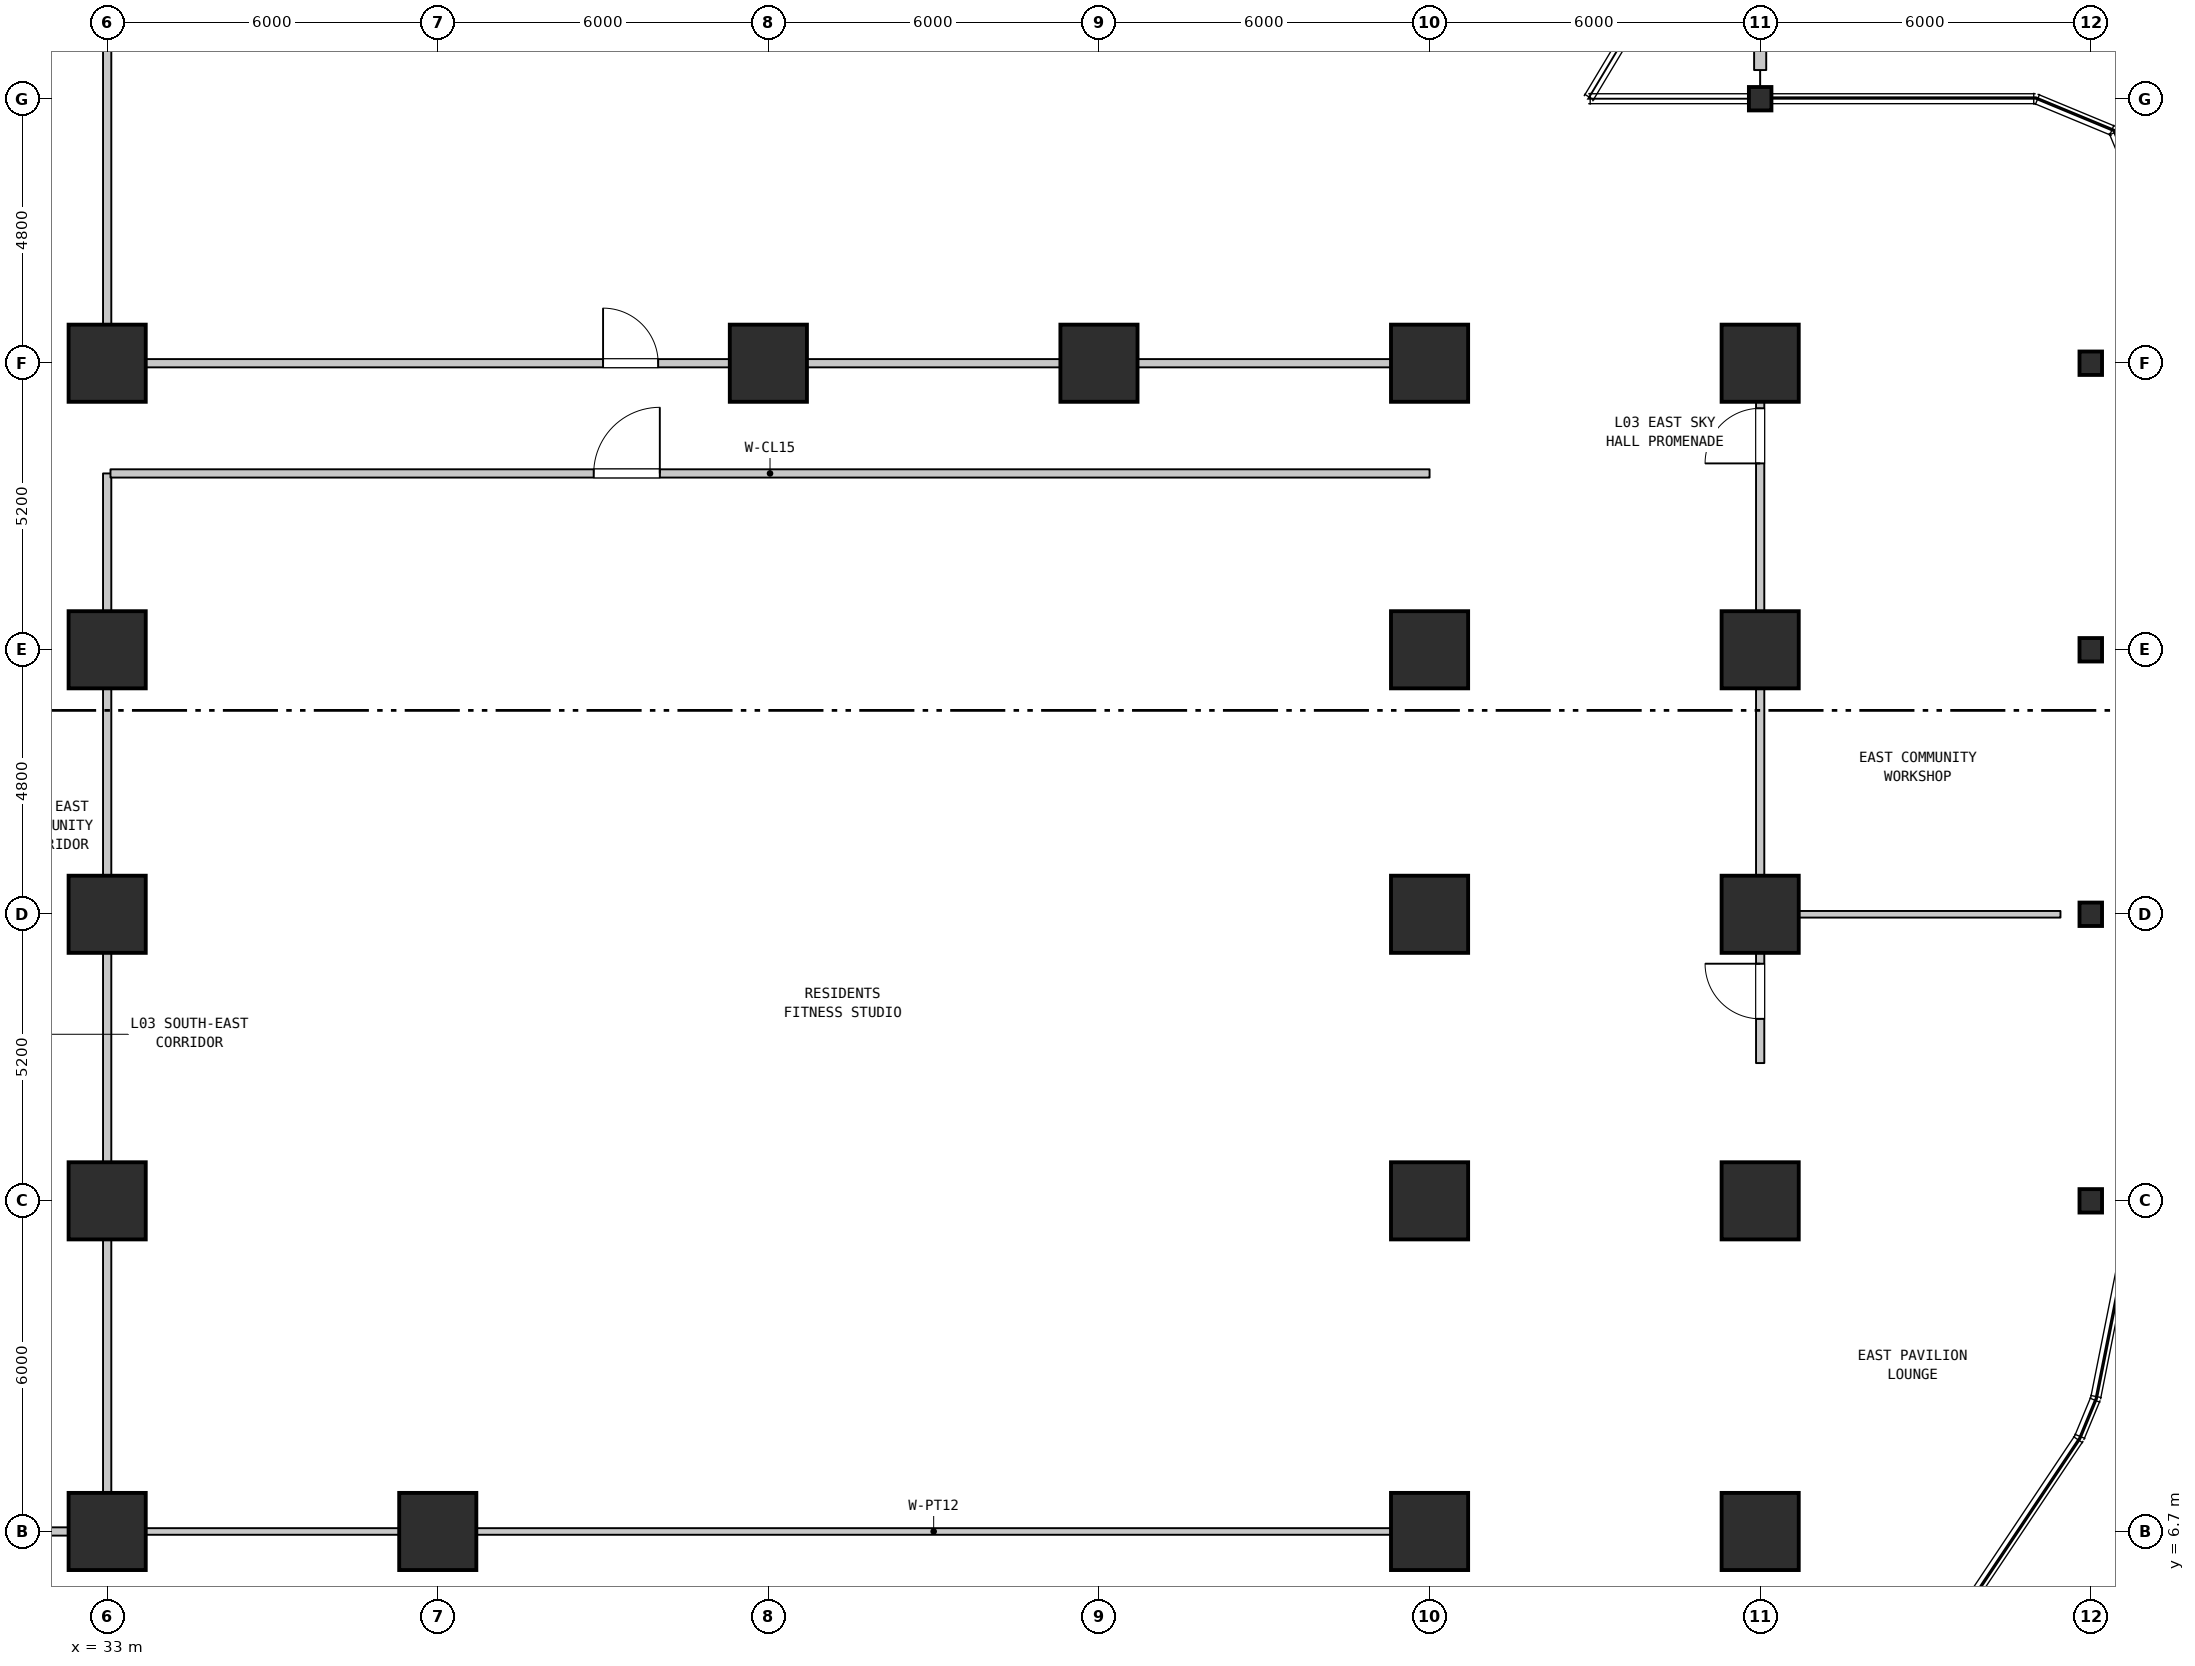
"""IFC4 building model, lengths in metres.
Left out: names, types, materials, properties, quantities, classifications, styles, units other than length and angle.
Written with IfcOpenShell. Run it as: python <this file> out.ifc"""

import sys

from ifc_helpers import new_model, si_unit, direction, frame, frame_2d, origin, origin_2d, place, context, subcontext, project, spatial, rectangle, i_section, extrude, element, fill, save


model = new_model("IFC4")
c1 = context("Model", 3, precision=1e-05, world=origin(), true_north=direction((0.0, 1.0)))
c2 = subcontext(c1, "Body", "Model", "MODEL_VIEW")
j1 = project(units=[si_unit("LENGTHUNIT", "METRE"), si_unit("PLANEANGLEUNIT", "RADIAN")], contexts=[c1])
p1 = place(None, origin())
s1 = spatial("IfcSite", under=j1, at=p1, CompositionType="ELEMENT")
p2 = place(p1, origin())
s2 = spatial("IfcBuilding", under=s1, at=p2, CompositionType="ELEMENT")
p3 = place(p2, frame((0.0, 0.0, 19.0)))
s3 = spatial("IfcBuildingStorey", under=s2, at=p3, CompositionType="ELEMENT", Elevation=19.0)
for number, where, z_axis, x_axis in (
    (1, (33.0, 6.7, 0.0), (0.0, 0.0, 1.0), (1.0, 0.0, 0.0)),
    (2, (33.0, 12.7, 0.0), (0.0, 0.0, 1.0), (1.0, 0.0, 0.0)),
    (3, (33.0, 17.9, 0.0), (0.0, 0.0, 1.0), (1.0, 0.0, 0.0)),
    (4, (33.0, 22.7, 0.0), (0.0, 0.0, 1.0), (1.0, 0.0, 0.0)),
    (5, (33.0, 27.9, 0.0), (0.0, 0.0, 1.0), (1.0, 0.0, 0.0)),
    (6, (39.0, 6.7, 0.0), (0.0, 0.0, 1.0), (1.0, 0.0, 0.0)),
    (7, (45.0, 27.9, 0.0), (0.0, 0.0, 1.0), (1.0, 0.0, 0.0)),
    (8, (51.0, 27.9, 0.0), (0.0, 0.0, 1.0), (1.0, 0.0, 0.0)),
    (9, (57.0, 6.7, 0.0), (0.0, 0.0, 1.0), (1.0, 0.0, 0.0)),
    (10, (57.0, 12.7, 0.0), (0.0, 0.0, 1.0), (1.0, 0.0, 0.0)),
    (11, (57.0, 17.9, 0.0), (0.0, 0.0, 1.0), (1.0, 0.0, 0.0)),
    (12, (57.0, 22.7, 0.0), (0.0, 0.0, 1.0), (1.0, 0.0, 0.0)),
    (13, (57.0, 27.9, 0.0), (0.0, 0.0, 1.0), (1.0, 0.0, 0.0)),
    (14, (63.0, 6.7, 0.0), (0.0, 0.0, 1.0), (1.0, 0.0, 0.0)),
    (15, (63.0, 12.7, 0.0), (0.0, 0.0, 1.0), (1.0, 0.0, 0.0)),
    (16, (63.0, 17.9, 0.0), (0.0, 0.0, 1.0), (1.0, 0.0, 0.0)),
    (17, (63.0, 22.7, 0.0), (0.0, 0.0, 1.0), (1.0, 0.0, 0.0)),
    (18, (63.0, 27.9, 0.0), (0.0, 0.0, 1.0), (1.0, 0.0, 0.0)),
):
    element("IfcColumn", number, at=place(p3, frame(where, z_axis=z_axis, x_axis=x_axis)), inside=s3, PredefinedType="COLUMN", context=c2, shape_type="SweptSolid", body=[
        extrude(rectangle(XDim=1.4, YDim=1.4, at=origin_2d()), origin(), (0.0, 0.0, 1.0), 5.0),
    ])
for number, where, z_axis, x_axis in (
    (19, (63.0, 32.7, 0.0), (0.0, 0.0, 1.0), (1.0, 0.0, 0.0)),
    (20, (69.0, 12.7, 0.0), (0.0, 0.0, 1.0), (1.0, 0.0, 0.0)),
    (21, (69.0, 17.9, 0.0), (0.0, 0.0, 1.0), (1.0, 0.0, 0.0)),
    (22, (69.0, 22.7, 0.0), (0.0, 0.0, 1.0), (1.0, 0.0, 0.0)),
    (23, (69.0, 27.9, 0.0), (0.0, 0.0, 1.0), (1.0, 0.0, 0.0)),
):
    element("IfcColumn", number, at=place(p3, frame(where, z_axis=z_axis, x_axis=x_axis)), inside=s3, PredefinedType="COLUMN", context=c2, shape_type="SweptSolid", body=[
        extrude(i_section(OverallWidth=0.409, OverallDepth=0.425, WebThickness=0.032, FlangeThickness=0.052, FilletRadius=0.015, at=origin_2d()), origin(), (0.0, 0.0, 1.0), 5.0),
    ])
p4 = place(p3, frame((63.0, 33.22, 0.0), z_axis=(0.0, 0.0, 1.0), x_axis=(0.0, 1.0, 0.0)))
e24 = element("IfcWall", 24, at=p4, inside=s3, PredefinedType="PARAPET", context=c2, shape_type="SweptSolid", body=[
    extrude(rectangle(XDim=4.154, YDim=0.22, at=frame_2d((2.077, 0.0))), origin(), (0.0, 0.0, 1.0), 0.55),
])
p5 = place(p3, frame((33.0, 6.7, 0.0), z_axis=(0.0, 0.0, 1.0), x_axis=(0.0, 1.0, 0.0)))
e25 = element("IfcWall", 25, at=p5, inside=s3, PredefinedType="STANDARD", context=c2, shape_type="SweptSolid", body=[
    extrude(rectangle(XDim=19.2, YDim=0.15, at=frame_2d((9.6, 0.0))), origin(), (0.0, 0.0, 1.0), 4.185),
])
p6 = place(p3, frame((33.0, 27.9, 0.0), z_axis=(0.0, 0.0, 1.0), x_axis=(0.0, 1.0, 0.0)))
e26 = element("IfcWall", 26, at=p6, inside=s3, PredefinedType="STANDARD", context=c2, shape_type="SweptSolid", body=[
    extrude(rectangle(XDim=10.0, YDim=0.15, at=frame_2d((5.0, 0.0))), origin(), (0.0, 0.0, 1.0), 4.185),
])
p7 = place(p3, frame((63.0, 15.2, 0.0), z_axis=(0.0, 0.0, 1.0), x_axis=(0.0, 1.0, 0.0)))
e27 = element("IfcWall", 27, at=p7, inside=s3, PredefinedType="STANDARD", context=c2, shape_type="SweptSolid", body=[
    extrude(rectangle(XDim=12.7, YDim=0.15, at=frame_2d((6.35, 0.0))), origin(), (0.0, 0.0, 1.0), 4.185),
])
p8 = place(p7, frame((0.803, 0.0, 0.0)))
e28 = element("IfcOpeningElement", 28, at=p8, cuts=e27, PredefinedType="OPENING", context=c2, shape_type="SweptSolid", body=[
    extrude(rectangle(XDim=1.0, YDim=2.15, at=frame_2d((0.5, 1.075))), frame((0.0, 0.085, 0.0), z_axis=(0.0, -1.0, 0.0), x_axis=(1.0, 0.0, 0.0)), (0.0, 0.0, 1.0), 0.17),
])
p9 = place(p7, frame((10.882, 0.0, 0.0)))
e29 = element("IfcOpeningElement", 29, at=p9, cuts=e27, PredefinedType="OPENING", context=c2, shape_type="SweptSolid", body=[
    extrude(rectangle(XDim=1.0, YDim=2.15, at=frame_2d((0.5, 1.075))), frame((0.0, 0.085, 0.0), z_axis=(0.0, -1.0, 0.0), x_axis=(1.0, 0.0, 0.0)), (0.0, 0.0, 1.0), 0.17),
])
p10 = place(p3, frame((21.01, 6.7, 0.0), z_axis=(0.0, 0.0, 1.0), x_axis=(1.0, 0.0, 0.0)))
e30 = element("IfcWall", 30, at=p10, inside=s3, PredefinedType="STANDARD", context=c2, shape_type="SweptSolid", body=[
    extrude(rectangle(XDim=11.93, YDim=0.15, at=frame_2d((5.965, 0.0))), origin(), (0.0, 0.0, 1.0), 4.185),
])
p11 = place(p10, frame((4.184, 0.0, 0.0)))
e31 = element("IfcOpeningElement", 31, at=p11, cuts=e30, PredefinedType="OPENING", context=c2, shape_type="SweptSolid", body=[
    extrude(rectangle(XDim=1.0, YDim=2.15, at=frame_2d((0.5, 1.075))), frame((0.0, 0.085, 0.0), z_axis=(0.0, -1.0, 0.0), x_axis=(1.0, 0.0, 0.0)), (0.0, 0.0, 1.0), 0.17),
])
p12 = place(p3, frame((33.06, 6.7, 0.0), z_axis=(0.0, 0.0, 1.0), x_axis=(1.0, 0.0, 0.0)))
e32 = element("IfcWall", 32, at=p12, inside=s3, PredefinedType="PARTITIONING", context=c2, shape_type="SweptSolid", body=[
    extrude(rectangle(XDim=5.94, YDim=0.12, at=frame_2d((2.97, 0.0))), origin(), (0.0, 0.0, 1.0), 4.185),
])
p13 = place(p3, frame((63.06, 17.9, 0.0), z_axis=(0.0, 0.0, 1.0), x_axis=(1.0, 0.0, 0.0)))
e33 = element("IfcWall", 33, at=p13, inside=s3, PredefinedType="PARTITIONING", context=c2, shape_type="SweptSolid", body=[
    extrude(rectangle(XDim=5.39, YDim=0.12, at=frame_2d((2.695, 0.0))), origin(), (0.0, 0.0, 1.0), 4.185),
])
p14 = place(p3, frame((33.06, 25.9, 0.0), z_axis=(0.0, 0.0, 1.0), x_axis=(1.0, 0.0, 0.0)))
e34 = element("IfcWall", 34, at=p14, inside=s3, PredefinedType="STANDARD", context=c2, shape_type="SweptSolid", body=[
    extrude(rectangle(XDim=23.94, YDim=0.15, at=frame_2d((11.97, 0.0))), origin(), (0.0, 0.0, 1.0), 4.685),
])
p15 = place(p14, frame((8.77, 0.0, 0.0)))
e35 = element("IfcOpeningElement", 35, at=p15, cuts=e34, PredefinedType="OPENING", context=c2, shape_type="SweptSolid", body=[
    extrude(rectangle(XDim=1.2, YDim=2.2, at=frame_2d((0.6, 1.1))), frame((0.0, 0.085, 0.0), z_axis=(0.0, -1.0, 0.0), x_axis=(1.0, 0.0, 0.0)), (0.0, 0.0, 1.0), 0.17),
])
p16 = place(p3, frame((33.06, 27.9, 0.0), z_axis=(0.0, 0.0, 1.0), x_axis=(1.0, 0.0, 0.0)))
e36 = element("IfcWall", 36, at=p16, inside=s3, PredefinedType="STANDARD", context=c2, shape_type="SweptSolid", body=[
    extrude(rectangle(XDim=23.94, YDim=0.15, at=frame_2d((11.97, 0.0))), origin(), (0.0, 0.0, 1.0), 4.185),
])
p17 = place(p16, frame((8.94, 0.0, 0.0)))
e37 = element("IfcOpeningElement", 37, at=p17, cuts=e36, PredefinedType="OPENING", context=c2, shape_type="SweptSolid", body=[
    extrude(rectangle(XDim=1.0, YDim=2.15, at=frame_2d((0.5, 1.075))), frame((0.0, 0.085, 0.0), z_axis=(0.0, -1.0, 0.0), x_axis=(1.0, 0.0, 0.0)), (0.0, 0.0, 1.0), 0.17),
])
p18 = place(p3, frame((39.0, 6.7, 0.0), z_axis=(0.0, 0.0, 1.0), x_axis=(1.0, 0.0, 0.0)))
e38 = element("IfcWall", 38, at=p18, inside=s3, PredefinedType="PARTITIONING", context=c2, shape_type="SweptSolid", body=[
    extrude(rectangle(XDim=18.0, YDim=0.12, at=frame_2d((9.0, 0.0))), origin(), (0.0, 0.0, 1.0), 4.085),
])
p19 = place(p8, origin())
e39 = element("IfcDoor", 39, at=p19, inside=s3, OperationType="SINGLE_SWING_RIGHT", PredefinedType="DOOR", context=c2, shape_type="SweptSolid", body=[
    extrude(rectangle(XDim=1.0, YDim=2.15, at=frame_2d((0.5, 1.075))), frame((0.0, 0.025, 0.0), z_axis=(0.0, -1.0, 0.0), x_axis=(1.0, 0.0, 0.0)), (0.0, 0.0, 1.0), 0.05),
])
fill(e28, e39)
p20 = place(p9, origin())
e40 = element("IfcDoor", 40, at=p20, inside=s3, OperationType="SINGLE_SWING_LEFT", PredefinedType="DOOR", context=c2, shape_type="SweptSolid", body=[
    extrude(rectangle(XDim=1.0, YDim=2.15, at=frame_2d((0.5, 1.075))), frame((0.0, 0.025, 0.0), z_axis=(0.0, -1.0, 0.0), x_axis=(1.0, 0.0, 0.0)), (0.0, 0.0, 1.0), 0.05),
])
fill(e29, e40)
p21 = place(p15, origin())
e41 = element("IfcDoor", 41, at=p21, inside=s3, OperationType="SINGLE_SWING_RIGHT", PredefinedType="DOOR", context=c2, shape_type="SweptSolid", body=[
    extrude(rectangle(XDim=1.2, YDim=2.2, at=frame_2d((0.6, 1.1))), frame((0.0, 0.025, 0.0), z_axis=(0.0, -1.0, 0.0), x_axis=(1.0, 0.0, 0.0)), (0.0, 0.0, 1.0), 0.05),
])
fill(e35, e41)
p22 = place(p17, origin())
e42 = element("IfcDoor", 42, at=p22, inside=s3, OperationType="SINGLE_SWING_LEFT", PredefinedType="DOOR", context=c2, shape_type="SweptSolid", body=[
    extrude(rectangle(XDim=1.0, YDim=2.15, at=frame_2d((0.5, 1.075))), frame((0.0, 0.025, 0.0), z_axis=(0.0, -1.0, 0.0), x_axis=(1.0, 0.0, 0.0)), (0.0, 0.0, 1.0), 0.05),
])
fill(e37, e42)
save(model, sys.argv[1])
